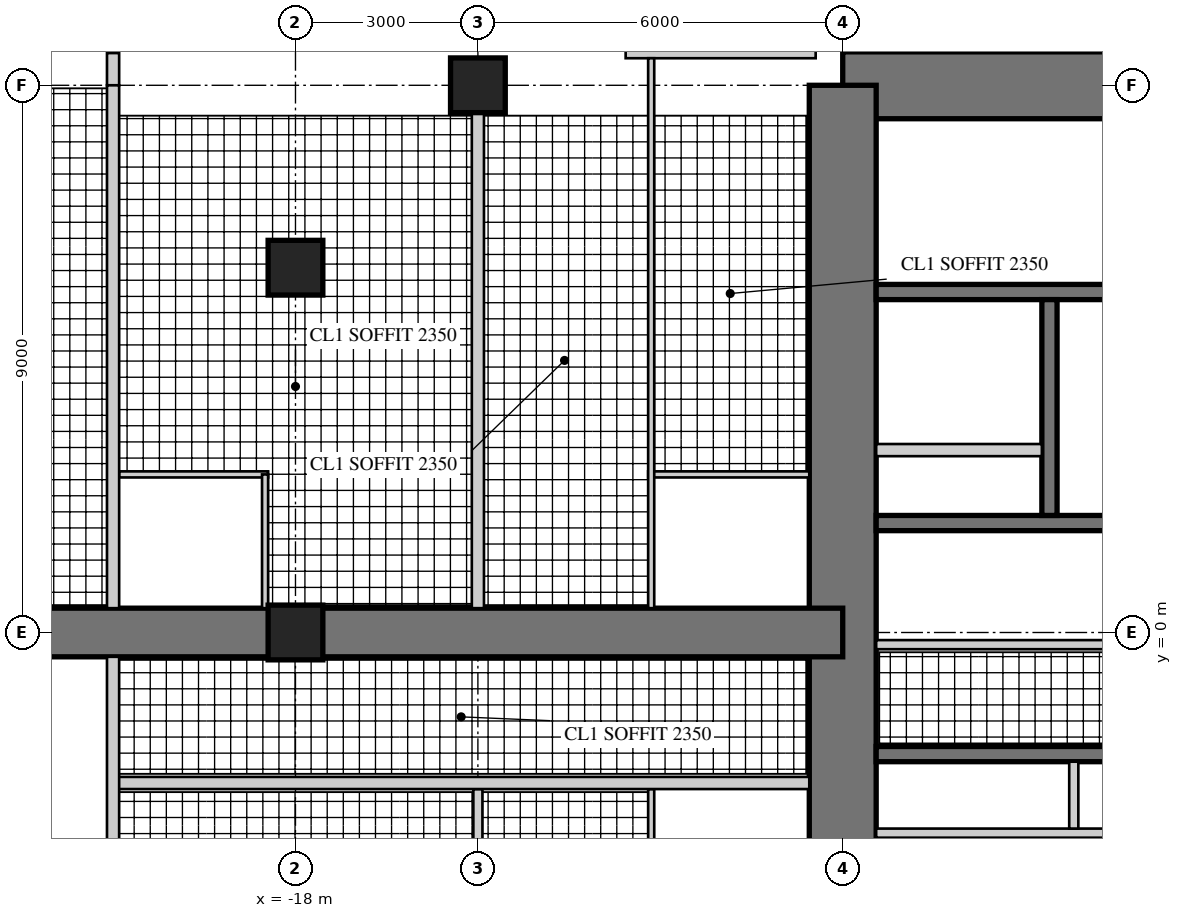
"""IFC4 building model, lengths in metres.
Left out: names, types, materials, properties, quantities, classifications, styles, units other than length and angle.
Written with IfcOpenShell. Run it as: python <this file> out.ifc"""

import sys

from ifc_helpers import new_model, si_unit, direction, frame, frame_2d, origin, origin_2d, place, context, subcontext, project, spatial, rectangle, hollow_rectangle, extrude, element, fill, save


model = new_model("IFC4")
c1 = context("Model", 3, precision=1e-05, world=origin(), true_north=direction((0.0, 1.0)))
c2 = subcontext(c1, "Body", "Model", "MODEL_VIEW")
j1 = project(units=[si_unit("LENGTHUNIT", "METRE"), si_unit("PLANEANGLEUNIT", "RADIAN")], contexts=[c1])
p1 = place(None, origin())
s1 = spatial("IfcSite", under=j1, at=p1, CompositionType="ELEMENT")
p2 = place(p1, origin())
s2 = spatial("IfcBuilding", under=s1, at=p2, CompositionType="ELEMENT")
p3 = place(p2, frame((0.0, 0.0, 200.1)))
s3 = spatial("IfcBuildingStorey", under=s2, at=p3, CompositionType="ELEMENT", Elevation=200.1)
p4 = place(p3, frame((9.0, 9.0, 0.0), z_axis=(0.0, 0.0, 1.0), x_axis=(-1.0, 0.0, 0.0)))
e1 = element("IfcWall", 1, at=p4, inside=s3, PredefinedType="SHEAR", context=c2, shape_type="SweptSolid", body=[
    extrude(rectangle(XDim=18.0, YDim=1.1, at=frame_2d((9.0, 0.0))), origin(), (0.0, 0.0, 1.0), 3.4),
])
p5 = place(p4, frame((9.8, 0.0, 0.0)))
e2 = element("IfcOpeningElement", 2, at=p5, cuts=e1, PredefinedType="OPENING", context=c2, shape_type="SweptSolid", body=[
    extrude(rectangle(XDim=1.0, YDim=2.4, at=frame_2d((0.5, 1.2))), frame((0.0, 0.56, 0.0), z_axis=(0.0, -1.0, 0.0), x_axis=(1.0, 0.0, 0.0)), (0.0, 0.0, 1.0), 1.12),
])
p6 = place(p3, frame((-9.0, 9.0, 0.0), z_axis=(0.0, 0.0, 1.0), x_axis=(0.0, -1.0, 0.0)))
e3 = element("IfcWall", 3, at=p6, inside=s3, PredefinedType="SHEAR", context=c2, shape_type="SweptSolid", body=[
    extrude(rectangle(XDim=18.0, YDim=1.1, at=frame_2d((9.0, 0.0))), origin(), (0.0, 0.0, 1.0), 3.4),
])
p7 = place(p6, frame((9.8, 0.0, 0.0)))
e4 = element("IfcOpeningElement", 4, at=p7, cuts=e3, PredefinedType="OPENING", context=c2, shape_type="SweptSolid", body=[
    extrude(rectangle(XDim=1.0, YDim=2.4, at=frame_2d((0.5, 1.2))), frame((0.0, 0.56, 0.0), z_axis=(0.0, -1.0, 0.0), x_axis=(1.0, 0.0, 0.0)), (0.0, 0.0, 1.0), 1.12),
])
p8 = place(p3, frame((-2.125, 1.8, 0.0), z_axis=(0.0, 0.0, 1.0), x_axis=(-1.0, 0.0, 0.0)))
e5 = element("IfcWall", 5, at=p8, inside=s3, PredefinedType="SHEAR", context=c2, shape_type="SweptSolid", body=[
    extrude(rectangle(XDim=6.325, YDim=0.25, at=frame_2d((3.163, 0.0))), origin(), (0.0, 0.0, 1.0), 3.4),
])
p9 = place(p3, frame((-2.125, 5.6, 0.0), z_axis=(0.0, 0.0, 1.0), x_axis=(-1.0, 0.0, 0.0)))
e6 = element("IfcWall", 6, at=p9, inside=s3, PredefinedType="SHEAR", context=c2, shape_type="SweptSolid", body=[
    extrude(rectangle(XDim=6.325, YDim=0.25, at=frame_2d((3.163, 0.0))), origin(), (0.0, 0.0, 1.0), 3.4),
])
p10 = place(p9, frame((0.175, 0.0, 0.0)))
e7 = element("IfcOpeningElement", 7, at=p10, cuts=e6, PredefinedType="OPENING", context=c2, shape_type="SweptSolid", body=[
    extrude(rectangle(XDim=1.0, YDim=2.1, at=frame_2d((0.5, 1.05))), frame((0.0, 0.135, 0.0), z_axis=(0.0, -1.0, 0.0), x_axis=(1.0, 0.0, 0.0)), (0.0, 0.0, 1.0), 0.27),
])
p11 = place(p3, frame((-5.6, 1.925, 0.0), z_axis=(0.0, 0.0, 1.0), x_axis=(0.0, 1.0, 0.0)))
e8 = element("IfcWall", 8, at=p11, inside=s3, PredefinedType="SHEAR", context=c2, shape_type="SweptSolid", body=[
    extrude(rectangle(XDim=3.55, YDim=0.25, at=frame_2d((1.775, 0.0))), origin(), (0.0, 0.0, 1.0), 3.4),
])
p12 = place(p11, frame((1.525, 0.0, 0.0)))
e9 = element("IfcOpeningElement", 9, at=p12, cuts=e8, PredefinedType="OPENING", context=c2, shape_type="SweptSolid", body=[
    extrude(rectangle(XDim=1.1, YDim=2.2, at=frame_2d((0.55, 1.1))), frame((0.0, 0.135, 0.0), z_axis=(0.0, -1.0, 0.0), x_axis=(1.0, 0.0, 0.0)), (0.0, 0.0, 1.0), 0.27),
])
p13 = place(p11, frame((0.075, 0.0, 0.0)))
e10 = element("IfcOpeningElement", 10, at=p13, cuts=e8, PredefinedType="OPENING", context=c2, shape_type="SweptSolid", body=[
    extrude(rectangle(XDim=0.8, YDim=2.1, at=frame_2d((0.4, 1.05))), frame((0.0, 0.135, 0.0), z_axis=(0.0, -1.0, 0.0), x_axis=(1.0, 0.0, 0.0)), (0.0, 0.0, 1.0), 0.27),
])
p14 = place(p3, frame((-5.725, 3.0, 0.0), z_axis=(0.0, 0.0, 1.0), x_axis=(-1.0, 0.0, 0.0)))
e11 = element("IfcWall", 11, at=p14, inside=s3, PredefinedType="PARTITIONING", context=c2, shape_type="SweptSolid", body=[
    extrude(rectangle(XDim=2.725, YDim=0.2, at=frame_2d((1.362, 0.0))), origin(), (0.0, 0.0, 1.0), 3.4),
])
p15 = place(p3, frame((-1.925, -2.0, 0.0), z_axis=(0.0, 0.0, 1.0), x_axis=(-1.0, 0.0, 0.0)))
e12 = element("IfcWall", 12, at=p15, inside=s3, PredefinedType="SHEAR", context=c2, shape_type="SweptSolid", body=[
    extrude(rectangle(XDim=6.525, YDim=0.25, at=frame_2d((3.262, 0.0))), origin(), (0.0, 0.0, 1.0), 3.4),
])
p16 = place(p3, frame((-1.925, -3.3, 0.0), z_axis=(0.0, 0.0, 1.0), x_axis=(-1.0, 0.0, 0.0)))
e13 = element("IfcWall", 13, at=p16, inside=s3, PredefinedType="PARTITIONING", context=c2, shape_type="SweptSolid", body=[
    extrude(rectangle(XDim=6.525, YDim=0.15, at=frame_2d((3.262, 0.0))), origin(), (0.0, 0.0, 1.0), 3.4),
])
p17 = place(p16, frame((0.075, 0.0, 0.0)))
e14 = element("IfcOpeningElement", 14, at=p17, cuts=e13, PredefinedType="OPENING", context=c2, shape_type="SweptSolid", body=[
    extrude(rectangle(XDim=0.8, YDim=2.1, at=frame_2d((0.4, 1.05))), frame((0.0, 0.085, 0.0), z_axis=(0.0, -1.0, 0.0), x_axis=(1.0, 0.0, 0.0)), (0.0, 0.0, 1.0), 0.17),
])
p18 = place(p16, frame((3.675, 0.0, 0.0)))
e15 = element("IfcOpeningElement", 15, at=p18, cuts=e13, PredefinedType="OPENING", context=c2, shape_type="SweptSolid", body=[
    extrude(rectangle(XDim=0.8, YDim=2.1, at=frame_2d((0.4, 1.05))), frame((0.0, 0.085, 0.0), z_axis=(0.0, -1.0, 0.0), x_axis=(1.0, 0.0, 0.0)), (0.0, 0.0, 1.0), 0.17),
])
p19 = place(p3, frame((-5.2, -2.125, 0.0), z_axis=(0.0, 0.0, 1.0), x_axis=(0.0, -1.0, 0.0)))
e16 = element("IfcWall", 16, at=p19, inside=s3, PredefinedType="PARTITIONING", context=c2, shape_type="SweptSolid", body=[
    extrude(rectangle(XDim=1.1, YDim=0.15, at=frame_2d((0.55, 0.0))), origin(), (0.0, 0.0, 1.0), 3.4),
])
p20 = place(p3, frame((-9.0, 0.0, 0.0), z_axis=(0.0, 0.0, 1.0), x_axis=(-1.0, 0.0, 0.0)))
e17 = element("IfcWall", 17, at=p20, inside=s3, PredefinedType="SHEAR", context=c2, shape_type="SweptSolid", body=[
    extrude(rectangle(XDim=18.0, YDim=0.8, at=frame_2d((9.0, 0.0))), origin(), (0.0, 0.0, 1.0), 3.4),
])
p21 = place(p20, frame((3.95, 0.0, 0.0)))
e18 = element("IfcOpeningElement", 18, at=p21, cuts=e17, PredefinedType="OPENING", context=c2, shape_type="SweptSolid", body=[
    extrude(rectangle(XDim=1.0, YDim=2.15, at=frame_2d((0.5, 1.075))), frame((0.0, 0.41, 0.0), z_axis=(0.0, -1.0, 0.0), x_axis=(1.0, 0.0, 0.0)), (0.0, 0.0, 1.0), 0.82),
])
p22 = place(p20, frame((6.6, 0.0, 0.0)))
e19 = element("IfcOpeningElement", 19, at=p22, cuts=e17, PredefinedType="OPENING", context=c2, shape_type="SweptSolid", body=[
    extrude(rectangle(XDim=1.0, YDim=2.15, at=frame_2d((0.5, 1.075))), frame((0.0, 0.41, 0.0), z_axis=(0.0, -1.0, 0.0), x_axis=(1.0, 0.0, 0.0)), (0.0, 0.0, 1.0), 0.82),
])
p23 = place(p20, frame((13.25, 0.0, 0.0)))
e20 = element("IfcOpeningElement", 20, at=p23, cuts=e17, PredefinedType="OPENING", context=c2, shape_type="SweptSolid", body=[
    extrude(rectangle(XDim=1.0, YDim=2.2, at=frame_2d((0.5, 1.1))), frame((0.0, 0.41, 0.0), z_axis=(0.0, -1.0, 0.0), x_axis=(1.0, 0.0, 0.0)), (0.0, 0.0, 1.0), 0.82),
])
for number, where, z_axis, x_axis in (
    (21, (-15.0, 9.0, 0.0), (0.0, 0.0, 1.0), (1.0, 0.0, 0.0)),
    (22, (-18.0, 6.0, 0.0), (0.0, 0.0, 1.0), (1.0, 0.0, 0.0)),
    (23, (-18.0, 0.0, 0.0), (0.0, 0.0, 1.0), (1.0, 0.0, 0.0)),
):
    element("IfcColumn", number, at=place(p3, frame(where, z_axis=z_axis, x_axis=x_axis)), inside=s3, PredefinedType="COLUMN", context=c2, shape_type="SweptSolid", body=[
        extrude(rectangle(XDim=0.9, YDim=0.9, at=origin_2d()), origin(), (0.0, 0.0, 1.0), 3.4),
    ])
p24 = place(p3, frame((-9.445, 9.57, 0.0), z_axis=(0.0, 0.0, 1.0), x_axis=(-1.0, 0.0, 0.0)))
e24 = element("IfcWall", 24, at=p24, inside=s3, PredefinedType="SOLIDWALL", context=c2, shape_type="SweptSolid", body=[
    extrude(rectangle(XDim=3.125, YDim=0.25, at=frame_2d((1.562, 0.0))), origin(), (0.0, 0.0, 1.0), 3.22),
])
p25 = place(p24, frame((0.6, 0.0, 0.0)))
e25 = element("IfcOpeningElement", 25, at=p25, cuts=e24, PredefinedType="OPENING", context=c2, shape_type="SweptSolid", body=[
    extrude(rectangle(XDim=1.0, YDim=2.2, at=frame_2d((0.5, 1.1))), frame((0.0, 0.135, 0.0), z_axis=(0.0, -1.0, 0.0), x_axis=(1.0, 0.0, 0.0)), (0.0, 0.0, 1.0), 0.27),
])
p26 = place(p3, frame((-2.325, -0.2, 0.0), z_axis=(0.0, 0.0, 1.0), x_axis=(-1.0, 0.0, 0.0)))
e26 = element("IfcWall", 26, at=p26, inside=s3, PredefinedType="PARTITIONING", context=c2, shape_type="SweptSolid", body=[
    extrude(rectangle(XDim=6.125, YDim=0.15, at=frame_2d((3.062, 0.0))), origin(), (0.0, 0.0, 1.0), 3.22),
])
p27 = place(p26, frame((0.4, 0.0, 0.0)))
e27 = element("IfcOpeningElement", 27, at=p27, cuts=e26, PredefinedType="OPENING", context=c2, shape_type="SweptSolid", body=[
    extrude(rectangle(XDim=1.0, YDim=2.1, at=frame_2d((0.5, 1.05))), frame((0.0, 0.085, 0.0), z_axis=(0.0, -1.0, 0.0), x_axis=(1.0, 0.0, 0.0)), (0.0, 0.0, 1.0), 0.17),
])
p28 = place(p3, frame((-12.15, -2.575, 0.0), z_axis=(0.0, 0.0, 1.0), x_axis=(0.0, -1.0, 0.0)))
e28 = element("IfcWall", 28, at=p28, inside=s3, PredefinedType="PARTITIONING", context=c2, shape_type="SweptSolid", body=[
    extrude(rectangle(XDim=2.2, YDim=0.1, at=frame_2d((1.1, 0.0))), origin(), (0.0, 0.0, 1.0), 3.22),
])
p29 = place(p28, frame((0.55, 0.0, 0.0)))
e29 = element("IfcOpeningElement", 29, at=p29, cuts=e28, PredefinedType="OPENING", context=c2, shape_type="SweptSolid", body=[
    extrude(rectangle(XDim=0.9, YDim=2.1, at=frame_2d((0.45, 1.05))), frame((0.0, 0.06, 0.0), z_axis=(0.0, -1.0, 0.0), x_axis=(1.0, 0.0, 0.0)), (0.0, 0.0, 1.0), 0.12),
])
p30 = place(p3, frame((-15.0, -2.575, 0.0), z_axis=(0.0, 0.0, 1.0), x_axis=(0.0, -1.0, 0.0)))
e30 = element("IfcWall", 30, at=p30, inside=s3, PredefinedType="PARTITIONING", context=c2, shape_type="SweptSolid", body=[
    extrude(rectangle(XDim=5.975, YDim=0.15, at=frame_2d((2.988, 0.0))), origin(), (0.0, 0.0, 1.0), 2.47),
])
p31 = place(p30, frame((0.5, 0.0, 0.0)))
e31 = element("IfcOpeningElement", 31, at=p31, cuts=e30, PredefinedType="OPENING", context=c2, shape_type="SweptSolid", body=[
    extrude(rectangle(XDim=1.0, YDim=2.1, at=frame_2d((0.5, 1.05))), frame((0.0, 0.085, 0.0), z_axis=(0.0, -1.0, 0.0), x_axis=(1.0, 0.0, 0.0)), (0.0, 0.0, 1.0), 0.17),
])
p32 = place(p3, frame((-9.55, 2.6, 0.0), z_axis=(0.0, 0.0, 1.0), x_axis=(-1.0, 0.0, 0.0)))
e32 = element("IfcWall", 32, at=p32, inside=s3, PredefinedType="PARTITIONING", context=c2, shape_type="SweptSolid", body=[
    extrude(rectangle(XDim=2.65, YDim=0.1, at=frame_2d((1.325, 0.0))), origin(), (0.0, 0.0, 1.0), 3.22),
])
p33 = place(p3, frame((-12.15, 9.445, 0.0), z_axis=(0.0, 0.0, 1.0), x_axis=(0.0, -1.0, 0.0)))
e33 = element("IfcWall", 33, at=p33, inside=s3, PredefinedType="PARTITIONING", context=c2, shape_type="SweptSolid", body=[
    extrude(rectangle(XDim=9.045, YDim=0.1, at=frame_2d((4.522, 0.0))), origin(), (0.0, 0.0, 1.0), 3.22),
])
p34 = place(p33, frame((5.495, 0.0, 0.0)))
e34 = element("IfcOpeningElement", 34, at=p34, cuts=e33, PredefinedType="OPENING", context=c2, shape_type="SweptSolid", body=[
    extrude(rectangle(XDim=0.9, YDim=2.1, at=frame_2d((0.45, 1.05))), frame((0.0, 0.06, 0.0), z_axis=(0.0, -1.0, 0.0), x_axis=(1.0, 0.0, 0.0)), (0.0, 0.0, 1.0), 0.12),
])
p35 = place(p33, frame((7.595, 0.0, 0.0)))
e35 = element("IfcOpeningElement", 35, at=p35, cuts=e33, PredefinedType="OPENING", context=c2, shape_type="SweptSolid", body=[
    extrude(rectangle(XDim=0.9, YDim=2.1, at=frame_2d((0.45, 1.05))), frame((0.0, 0.06, 0.0), z_axis=(0.0, -1.0, 0.0), x_axis=(1.0, 0.0, 0.0)), (0.0, 0.0, 1.0), 0.12),
])
p36 = place(p3, frame((-15.0, 8.55, 0.0), z_axis=(0.0, 0.0, 1.0), x_axis=(0.0, -1.0, 0.0)))
e36 = element("IfcWall", 36, at=p36, inside=s3, PredefinedType="SOLIDWALL", context=c2, shape_type="SweptSolid", body=[
    extrude(rectangle(XDim=8.15, YDim=0.2, at=frame_2d((4.075, 0.0))), origin(), (0.0, 0.0, 1.0), 2.47),
])
p37 = place(p3, frame((-18.45, 2.6, 0.0), z_axis=(0.0, 0.0, 1.0), x_axis=(-1.0, 0.0, 0.0)))
e37 = element("IfcWall", 37, at=p37, inside=s3, PredefinedType="PARTITIONING", context=c2, shape_type="SweptSolid", body=[
    extrude(rectangle(XDim=2.45, YDim=0.1, at=frame_2d((1.225, 0.0))), origin(), (0.0, 0.0, 1.0), 3.22),
])
p38 = place(p3, frame((-18.5, 2.6, 0.0), z_axis=(0.0, 0.0, 1.0), x_axis=(0.0, -1.0, 0.0)))
e38 = element("IfcWall", 38, at=p38, inside=s3, PredefinedType="PARTITIONING", context=c2, shape_type="SweptSolid", body=[
    extrude(rectangle(XDim=2.2, YDim=0.1, at=frame_2d((1.1, 0.0))), origin(), (0.0, 0.0, 1.0), 3.22),
])
p39 = place(p38, frame((0.55, 0.0, 0.0)))
e39 = element("IfcOpeningElement", 39, at=p39, cuts=e38, PredefinedType="OPENING", context=c2, shape_type="SweptSolid", body=[
    extrude(rectangle(XDim=0.9, YDim=2.1, at=frame_2d((0.45, 1.05))), frame((0.0, 0.06, 0.0), z_axis=(0.0, -1.0, 0.0), x_axis=(1.0, 0.0, 0.0)), (0.0, 0.0, 1.0), 0.12),
])
p40 = place(p3, frame((-9.55, -2.475, 0.0), z_axis=(0.0, 0.0, 1.0), x_axis=(-1.0, 0.0, 0.0)))
e40 = element("IfcWall", 40, at=p40, inside=s3, PredefinedType="SOLIDWALL", context=c2, shape_type="SweptSolid", body=[
    extrude(rectangle(XDim=11.45, YDim=0.2, at=frame_2d((5.725, 0.0))), origin(), (0.0, 0.0, 1.0), 3.22),
])
p41 = place(p40, frame((3.4, 0.0, 0.0)))
e41 = element("IfcOpeningElement", 41, at=p41, cuts=e40, PredefinedType="OPENING", context=c2, shape_type="SweptSolid", body=[
    extrude(rectangle(XDim=1.0, YDim=2.15, at=frame_2d((0.5, 1.075))), frame((0.0, 0.11, 0.0), z_axis=(0.0, -1.0, 0.0), x_axis=(1.0, 0.0, 0.0)), (0.0, 0.0, 1.0), 0.22),
])
p42 = place(p3, frame((-21.0, 9.53, 0.0), z_axis=(0.0, 0.0, 1.0), x_axis=(0.0, -1.0, 0.0)))
e42 = element("IfcWall", 42, at=p42, inside=s3, PredefinedType="SOLIDWALL", context=c2, shape_type="SweptSolid", body=[
    extrude(rectangle(XDim=0.53, YDim=0.2, at=frame_2d((0.265, 0.0))), origin(), (0.0, 0.0, 1.0), 3.22),
])
p43 = place(p3, frame((-21.0, 9.0, 0.0), z_axis=(0.0, 0.0, 1.0), x_axis=(0.0, -1.0, 0.0)))
e43 = element("IfcWall", 43, at=p43, inside=s3, PredefinedType="SOLIDWALL", context=c2, shape_type="SweptSolid", body=[
    extrude(rectangle(XDim=8.6, YDim=0.2, at=frame_2d((4.3, 0.0))), origin(), (0.0, 0.0, 1.0), 2.62),
])
p44 = place(p3, frame((-21.0, -0.4, 0.0), z_axis=(0.0, 0.0, 1.0), x_axis=(0.0, -1.0, 0.0)))
e44 = element("IfcWall", 44, at=p44, inside=s3, PredefinedType="SOLIDWALL", context=c2, shape_type="SweptSolid", body=[
    extrude(rectangle(XDim=8.6, YDim=0.2, at=frame_2d((4.3, 0.0))), origin(), (0.0, 0.0, 1.0), 2.62),
])
p45 = place(p44, frame((0.4, 0.0, 0.0)))
e45 = element("IfcOpeningElement", 45, at=p45, cuts=e44, PredefinedType="OPENING", context=c2, shape_type="SweptSolid", body=[
    extrude(rectangle(XDim=1.0, YDim=2.2, at=frame_2d((0.5, 1.1))), frame((0.0, 0.11, 0.0), z_axis=(0.0, -1.0, 0.0), x_axis=(1.0, 0.0, 0.0)), (0.0, 0.0, 1.0), 0.22),
])
p46 = place(p25, origin())
e46 = element("IfcDoor", 46, at=p46, inside=s3, OperationType="SINGLE_SWING_LEFT", PredefinedType="DOOR", context=c2, shape_type="SweptSolid", body=[
    extrude(hollow_rectangle(XDim=1.0, YDim=2.2, WallThickness=0.06, at=frame_2d((0.5, 1.1))), frame((0.0, 0.025, 0.0), z_axis=(0.0, -1.0, 0.0), x_axis=(1.0, 0.0, 0.0)), (0.0, 0.0, 1.0), 0.05),
    extrude(rectangle(XDim=0.879, YDim=2.079, at=frame_2d((0.5, 1.1))), frame((0.0, 0.025, 0.0), z_axis=(0.0, -1.0, 0.0), x_axis=(1.0, 0.0, 0.0)), (0.0, 0.0, 1.0), 0.05),
])
fill(e25, e46)
p47 = place(p29, origin())
e47 = element("IfcDoor", 47, at=p47, inside=s3, OperationType="SINGLE_SWING_LEFT", PredefinedType="DOOR", context=c2, shape_type="SweptSolid", body=[
    extrude(rectangle(XDim=0.9, YDim=2.1, at=frame_2d((0.45, 1.05))), frame((0.0, 0.025, 0.0), z_axis=(0.0, -1.0, 0.0), x_axis=(1.0, 0.0, 0.0)), (0.0, 0.0, 1.0), 0.05),
])
fill(e29, e47)
p48 = place(p31, origin())
e48 = element("IfcDoor", 48, at=p48, inside=s3, OperationType="SINGLE_SWING_LEFT", PredefinedType="DOOR", context=c2, shape_type="SweptSolid", body=[
    extrude(rectangle(XDim=1.0, YDim=2.1, at=frame_2d((0.5, 1.05))), frame((0.0, 0.025, 0.0), z_axis=(0.0, -1.0, 0.0), x_axis=(1.0, 0.0, 0.0)), (0.0, 0.0, 1.0), 0.05),
])
fill(e31, e48)
p49 = place(p34, origin())
e49 = element("IfcDoor", 49, at=p49, inside=s3, OperationType="SINGLE_SWING_RIGHT", PredefinedType="DOOR", context=c2, shape_type="SweptSolid", body=[
    extrude(rectangle(XDim=0.9, YDim=2.1, at=frame_2d((0.45, 1.05))), frame((0.0, 0.025, 0.0), z_axis=(0.0, -1.0, 0.0), x_axis=(1.0, 0.0, 0.0)), (0.0, 0.0, 1.0), 0.05),
])
fill(e34, e49)
p50 = place(p35, origin())
e50 = element("IfcDoor", 50, at=p50, inside=s3, OperationType="SINGLE_SWING_RIGHT", PredefinedType="DOOR", context=c2, shape_type="SweptSolid", body=[
    extrude(rectangle(XDim=0.9, YDim=2.1, at=frame_2d((0.45, 1.05))), frame((0.0, 0.025, 0.0), z_axis=(0.0, -1.0, 0.0), x_axis=(1.0, 0.0, 0.0)), (0.0, 0.0, 1.0), 0.05),
])
fill(e35, e50)
p51 = place(p39, frame((0.9, 0.0, 0.0), z_axis=(0.0, 0.0, 1.0), x_axis=(-1.0, 0.0, 0.0)))
e51 = element("IfcDoor", 51, at=p51, inside=s3, OperationType="SINGLE_SWING_RIGHT", PredefinedType="DOOR", context=c2, shape_type="SweptSolid", body=[
    extrude(rectangle(XDim=0.9, YDim=2.1, at=frame_2d((0.45, 1.05))), frame((0.0, 0.025, 0.0), z_axis=(0.0, -1.0, 0.0), x_axis=(1.0, 0.0, 0.0)), (0.0, 0.0, 1.0), 0.05),
])
fill(e39, e51)
p52 = place(p41, origin())
e52 = element("IfcDoor", 52, at=p52, inside=s3, OperationType="SINGLE_SWING_LEFT", PredefinedType="DOOR", context=c2, shape_type="SweptSolid", body=[
    extrude(rectangle(XDim=1.0, YDim=2.15, at=frame_2d((0.5, 1.075))), frame((0.0, 0.025, 0.0), z_axis=(0.0, -1.0, 0.0), x_axis=(1.0, 0.0, 0.0)), (0.0, 0.0, 1.0), 0.05),
])
fill(e41, e52)
p53 = place(p45, frame((1.0, 0.0, 0.0), z_axis=(0.0, 0.0, 1.0), x_axis=(-1.0, 0.0, 0.0)))
e53 = element("IfcDoor", 53, at=p53, inside=s3, OperationType="SINGLE_SWING_RIGHT", PredefinedType="DOOR", context=c2, shape_type="SweptSolid", body=[
    extrude(rectangle(XDim=1.0, YDim=2.2, at=frame_2d((0.5, 1.1))), frame((0.0, 0.025, 0.0), z_axis=(0.0, -1.0, 0.0), x_axis=(1.0, 0.0, 0.0)), (0.0, 0.0, 1.0), 0.05),
])
fill(e45, e53)
p54 = place(p21, frame((1.0, 0.0, 0.0), z_axis=(0.0, 0.0, 1.0), x_axis=(-1.0, 0.0, 0.0)))
e54 = element("IfcDoor", 54, at=p54, inside=s3, OperationType="SINGLE_SWING_RIGHT", PredefinedType="DOOR", context=c2, shape_type="SweptSolid", body=[
    extrude(rectangle(XDim=1.0, YDim=2.15, at=frame_2d((0.5, 1.075))), frame((0.0, 0.025, 0.0), z_axis=(0.0, -1.0, 0.0), x_axis=(1.0, 0.0, 0.0)), (0.0, 0.0, 1.0), 0.05),
])
fill(e18, e54)
p55 = place(p22, frame((1.0, 0.0, 0.0), z_axis=(0.0, 0.0, 1.0), x_axis=(-1.0, 0.0, 0.0)))
e55 = element("IfcDoor", 55, at=p55, inside=s3, OperationType="SINGLE_SWING_RIGHT", PredefinedType="DOOR", context=c2, shape_type="SweptSolid", body=[
    extrude(rectangle(XDim=1.0, YDim=2.15, at=frame_2d((0.5, 1.075))), frame((0.0, 0.025, 0.0), z_axis=(0.0, -1.0, 0.0), x_axis=(1.0, 0.0, 0.0)), (0.0, 0.0, 1.0), 0.05),
])
fill(e19, e55)
p56 = place(p7, origin())
e56 = element("IfcDoor", 56, at=p56, inside=s3, OperationType="SINGLE_SWING_RIGHT", PredefinedType="DOOR", context=c2, shape_type="SweptSolid", body=[
    extrude(rectangle(XDim=1.0, YDim=2.4, at=frame_2d((0.5, 1.2))), frame((0.0, 0.055, 0.0), z_axis=(0.0, -1.0, 0.0), x_axis=(1.0, 0.0, 0.0)), (0.0, 0.0, 1.0), 0.05),
])
fill(e4, e56)
p57 = place(p12, origin())
e57 = element("IfcDoor", 57, at=p57, inside=s3, OperationType="DOUBLE_DOOR_SLIDING", PredefinedType="DOOR", context=c2, shape_type="SweptSolid", body=[
    extrude(rectangle(XDim=1.1, YDim=2.2, at=frame_2d((0.55, 1.1))), frame((0.0, 0.025, 0.0), z_axis=(0.0, -1.0, 0.0), x_axis=(1.0, 0.0, 0.0)), (0.0, 0.0, 1.0), 0.05),
])
fill(e9, e57)
p58 = place(p13, origin())
e58 = element("IfcDoor", 58, at=p58, inside=s3, OperationType="SINGLE_SWING_LEFT", PredefinedType="DOOR", context=c2, shape_type="SweptSolid", body=[
    extrude(rectangle(XDim=0.8, YDim=2.1, at=frame_2d((0.4, 1.05))), frame((0.0, 0.025, 0.0), z_axis=(0.0, -1.0, 0.0), x_axis=(1.0, 0.0, 0.0)), (0.0, 0.0, 1.0), 0.05),
])
fill(e10, e58)
p59 = place(p18, frame((0.8, 0.0, 0.0), z_axis=(0.0, 0.0, 1.0), x_axis=(-1.0, 0.0, 0.0)))
e59 = element("IfcDoor", 59, at=p59, inside=s3, OperationType="SINGLE_SWING_RIGHT", PredefinedType="DOOR", context=c2, shape_type="SweptSolid", body=[
    extrude(rectangle(XDim=0.8, YDim=2.1, at=frame_2d((0.4, 1.05))), frame((0.0, 0.025, 0.0), z_axis=(0.0, -1.0, 0.0), x_axis=(1.0, 0.0, 0.0)), (0.0, 0.0, 1.0), 0.05),
])
fill(e15, e59)
save(model, sys.argv[1])
